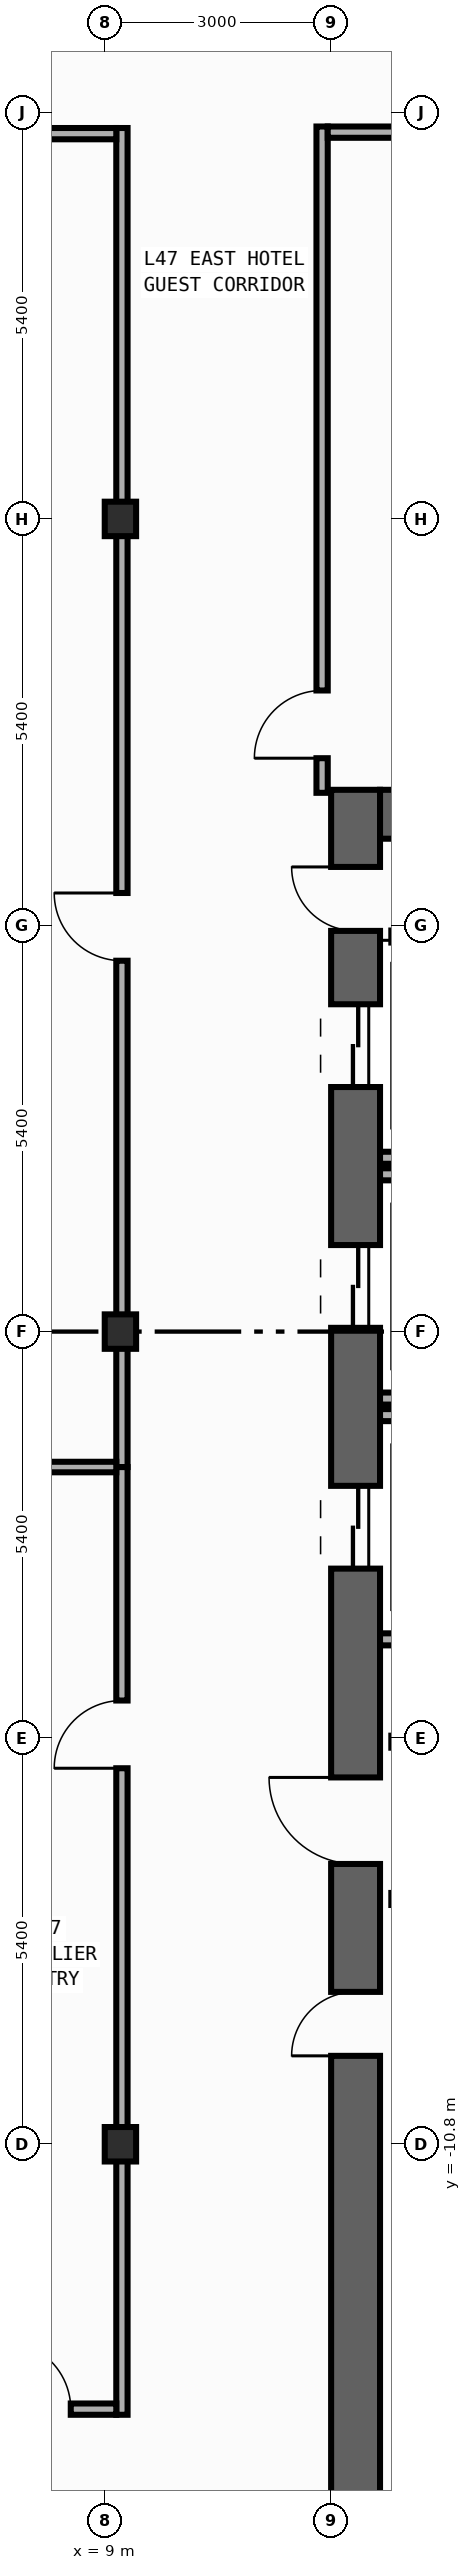
"""IFC4 building model, lengths in metres.
Left out: names, types, materials, properties, quantities, classifications, styles, units other than length and angle.
Written with IfcOpenShell. Run it as: python <this file> out.ifc"""

import sys

from ifc_helpers import new_model, si_unit, direction, frame, frame_2d, origin, origin_2d, place, context, subcontext, project, spatial, rectangle, i_section, extrude, element, fill, save


model = new_model("IFC4")
c1 = context("Model", 3, precision=1e-05, world=origin(), true_north=direction((0.0, 1.0)))
c2 = subcontext(c1, "Body", "Model", "MODEL_VIEW")
j1 = project(units=[si_unit("LENGTHUNIT", "METRE"), si_unit("PLANEANGLEUNIT", "RADIAN")], contexts=[c1])
p1 = place(None, origin())
s1 = spatial("IfcSite", under=j1, at=p1, CompositionType="ELEMENT")
p2 = place(p1, origin())
s2 = spatial("IfcBuilding", under=s1, at=p2, CompositionType="ELEMENT")
p3 = place(p2, frame((0.0, 0.0, 203.0)))
s3 = spatial("IfcBuildingStorey", under=s2, at=p3, CompositionType="ELEMENT", Elevation=203.0)
p4 = place(p3, frame((12.325, -19.8, 0.0), z_axis=(0.0, 0.0, 1.0), x_axis=(0.0, 1.0, 0.0)))
e1 = element("IfcWall", 1, at=p4, inside=s3, PredefinedType="SHEAR", context=c2, shape_type="SweptSolid", body=[
    extrude(rectangle(XDim=27.0, YDim=0.65, at=frame_2d((13.5, 0.0))), origin(), (0.0, 0.0, 1.0), 3.54),
])
p5 = place(p4, frame((23.05, 0.0, 0.0)))
e2 = element("IfcOpeningElement", 2, at=p5, cuts=e1, PredefinedType="OPENING", context=c2, shape_type="SweptSolid", body=[
    extrude(rectangle(XDim=1.1, YDim=2.2, at=frame_2d((0.55, 1.1))), frame((0.0, 0.335, 0.0), z_axis=(0.0, -1.0, 0.0), x_axis=(1.0, 0.0, 0.0)), (0.0, 0.0, 1.0), 0.67),
])
p6 = place(p4, frame((19.85, 0.0, 0.0)))
e3 = element("IfcOpeningElement", 3, at=p6, cuts=e1, PredefinedType="OPENING", context=c2, shape_type="SweptSolid", body=[
    extrude(rectangle(XDim=1.1, YDim=2.2, at=frame_2d((0.55, 1.1))), frame((0.0, 0.335, 0.0), z_axis=(0.0, -1.0, 0.0), x_axis=(1.0, 0.0, 0.0)), (0.0, 0.0, 1.0), 0.67),
])
p7 = place(p4, frame((16.65, 0.0, 0.0)))
e4 = element("IfcOpeningElement", 4, at=p7, cuts=e1, PredefinedType="OPENING", context=c2, shape_type="SweptSolid", body=[
    extrude(rectangle(XDim=1.1, YDim=2.2, at=frame_2d((0.55, 1.1))), frame((0.0, 0.335, 0.0), z_axis=(0.0, -1.0, 0.0), x_axis=(1.0, 0.0, 0.0)), (0.0, 0.0, 1.0), 0.67),
])
p8 = place(p4, frame((10.175, 0.0, 0.0)))
e5 = element("IfcOpeningElement", 5, at=p8, cuts=e1, PredefinedType="OPENING", context=c2, shape_type="SweptSolid", body=[
    extrude(rectangle(XDim=0.85, YDim=2.1, at=frame_2d((0.425, 1.05))), frame((0.0, 0.335, 0.0), z_axis=(0.0, -1.0, 0.0), x_axis=(1.0, 0.0, 0.0)), (0.0, 0.0, 1.0), 0.67),
])
p9 = place(p4, frame((12.725, 0.0, 0.0)))
e6 = element("IfcOpeningElement", 6, at=p9, cuts=e1, PredefinedType="OPENING", context=c2, shape_type="SweptSolid", body=[
    extrude(rectangle(XDim=1.15, YDim=2.2, at=frame_2d((0.575, 1.1))), frame((0.0, 0.335, 0.0), z_axis=(0.0, -1.0, 0.0), x_axis=(1.0, 0.0, 0.0)), (0.0, 0.0, 1.0), 0.67),
])
p10 = place(p4, frame((25.125, 0.0, 0.0)))
e7 = element("IfcOpeningElement", 7, at=p10, cuts=e1, PredefinedType="OPENING", context=c2, shape_type="SweptSolid", body=[
    extrude(rectangle(XDim=0.85, YDim=2.1, at=frame_2d((0.425, 1.05))), frame((0.0, 0.335, 0.0), z_axis=(0.0, -1.0, 0.0), x_axis=(1.0, 0.0, 0.0)), (0.0, 0.0, 1.0), 0.67),
])
p11 = place(p3, frame((12.65, 6.875, 0.0), z_axis=(0.0, 0.0, 1.0), x_axis=(1.0, 0.0, 0.0)))
e8 = element("IfcWall", 8, at=p11, inside=s3, PredefinedType="SHEAR", context=c2, shape_type="SweptSolid", body=[
    extrude(rectangle(XDim=7.1, YDim=0.65, at=frame_2d((3.55, 0.0))), origin(), (0.0, 0.0, 1.0), 3.54),
])
for number, where, z_axis, x_axis in (
    (9, (9.2, -10.8, 0.0), (0.0, 0.0, 1.0), (1.0, 0.0, 0.0)),
    (10, (9.2, 0.0, 0.0), (0.0, 0.0, 1.0), (1.0, 0.0, 0.0)),
    (11, (9.2, 10.8, 0.0), (0.0, 0.0, 1.0), (1.0, 0.0, 0.0)),
):
    element("IfcColumn", number, at=place(p3, frame(where, z_axis=z_axis, x_axis=x_axis)), inside=s3, PredefinedType="COLUMN", context=c2, shape_type="SweptSolid", body=[
        extrude(i_section(OverallWidth=0.417, OverallDepth=0.458, WebThickness=0.03, FlangeThickness=0.05, FilletRadius=0.022, at=origin_2d()), origin(), (0.0, 0.0, 1.0), 3.8),
    ])
for number, where, z_axis, x_axis in (
    (12, (12.65, 2.31, 0.0), (0.0, 0.0, 1.0), (1.0, 0.0, 0.0)),
    (13, (12.65, -0.89, 0.0), (0.0, 0.0, 1.0), (1.0, 0.0, 0.0)),
    (14, (12.65, 2.09, 0.0), (0.0, 0.0, 1.0), (1.0, 0.0, 0.0)),
    (15, (12.65, -4.09, 0.0), (0.0, 0.0, 1.0), (1.0, 0.0, 0.0)),
    (16, (12.65, -1.11, 0.0), (0.0, 0.0, 1.0), (1.0, 0.0, 0.0)),
):
    element("IfcWall", number, at=place(p3, frame(where, z_axis=z_axis, x_axis=x_axis)), inside=s3, PredefinedType="STANDARD", context=c2, shape_type="SweptSolid", body=[
        extrude(rectangle(XDim=2.34, YDim=0.16, at=frame_2d((1.17, 0.0))), origin(), (0.0, 0.0, 1.0), 3.54),
    ])
for number, where, z_axis, x_axis in (
    (17, (12.8, -5.45, 0.0), (0.0, 0.0, 1.0), (1.0, 0.0, 0.0)),
    (18, (12.8, -7.54, 0.0), (0.0, 0.0, 1.0), (1.0, 0.0, 0.0)),
    (19, (12.8, 5.25, 0.0), (0.0, 0.0, 1.0), (1.0, 0.0, 0.0)),
):
    element("IfcWall", number, at=place(p3, frame(where, z_axis=z_axis, x_axis=x_axis)), inside=s3, PredefinedType="STANDARD", context=c2, shape_type="SweptSolid", body=[
        extrude(rectangle(XDim=2.6, YDim=0.16, at=frame_2d((1.3, 0.0))), origin(), (0.0, 0.0, 1.0), 3.54),
    ])
p12 = place(p3, frame((9.22, -14.395, 0.0), z_axis=(0.0, 0.0, 1.0), x_axis=(0.0, 1.0, 0.0)))
e20 = element("IfcWall", 20, at=p12, inside=s3, PredefinedType="PARTITIONING", context=c2, shape_type="SweptSolid", body=[
    extrude(rectangle(XDim=12.595, YDim=0.15, at=frame_2d((6.297, 0.0))), origin(), (0.0, 0.0, 1.0), 2.952),
])
p13 = place(p12, frame((8.592, 0.0, 0.0)))
e21 = element("IfcOpeningElement", 21, at=p13, cuts=e20, PredefinedType="OPENING", context=c2, shape_type="SweptSolid", body=[
    extrude(rectangle(XDim=0.9, YDim=2.15, at=frame_2d((0.45, 1.075))), frame((0.0, 0.085, 0.0), z_axis=(0.0, -1.0, 0.0), x_axis=(1.0, 0.0, 0.0)), (0.0, 0.0, 1.0), 0.17),
])
p14 = place(p3, frame((9.22, -1.8, 0.0), z_axis=(0.0, 0.0, 1.0), x_axis=(0.0, 1.0, 0.0)))
e22 = element("IfcWall", 22, at=p14, inside=s3, PredefinedType="PARTITIONING", context=c2, shape_type="SweptSolid", body=[
    extrude(rectangle(XDim=17.795, YDim=0.15, at=frame_2d((8.897, 0.0))), origin(), (0.0, 0.0, 1.0), 2.952),
])
p15 = place(p14, frame((6.729, 0.0, 0.0)))
e23 = element("IfcOpeningElement", 23, at=p15, cuts=e22, PredefinedType="OPENING", context=c2, shape_type="SweptSolid", body=[
    extrude(rectangle(XDim=0.9, YDim=2.15, at=frame_2d((0.45, 1.075))), frame((0.0, 0.085, 0.0), z_axis=(0.0, -1.0, 0.0), x_axis=(1.0, 0.0, 0.0)), (0.0, 0.0, 1.0), 0.17),
])
p16 = place(p3, frame((11.88, 7.16, 0.0), z_axis=(0.0, 0.0, 1.0), x_axis=(0.0, 1.0, 0.0)))
e24 = element("IfcWall", 24, at=p16, inside=s3, PredefinedType="PARTITIONING", context=c2, shape_type="SweptSolid", body=[
    extrude(rectangle(XDim=8.855, YDim=0.15, at=frame_2d((4.427, 0.0))), origin(), (0.0, 0.0, 1.0), 3.54),
])
p17 = place(p16, frame((0.46, 0.0, 0.0)))
e25 = element("IfcOpeningElement", 25, at=p17, cuts=e24, PredefinedType="OPENING", context=c2, shape_type="SweptSolid", body=[
    extrude(rectangle(XDim=0.9, YDim=2.15, at=frame_2d((0.45, 1.075))), frame((0.0, 0.085, 0.0), z_axis=(0.0, -1.0, 0.0), x_axis=(1.0, 0.0, 0.0)), (0.0, 0.0, 1.0), 0.17),
])
p18 = place(p3, frame((-9.145, 15.92, 0.0), z_axis=(0.0, 0.0, 1.0), x_axis=(1.0, 0.0, 0.0)))
e26 = element("IfcWall", 26, at=p18, inside=s3, PredefinedType="PARTITIONING", context=c2, shape_type="SweptSolid", body=[
    extrude(rectangle(XDim=18.29, YDim=0.15, at=frame_2d((9.145, 0.0))), origin(), (0.0, 0.0, 1.0), 3.54),
])
p19 = place(p18, frame((15.725, 0.0, 0.0)))
e27 = element("IfcOpeningElement", 27, at=p19, cuts=e26, PredefinedType="OPENING", context=c2, shape_type="SweptSolid", body=[
    extrude(rectangle(XDim=0.9, YDim=2.15, at=frame_2d((0.45, 1.075))), frame((0.0, 0.085, 0.0), z_axis=(0.0, -1.0, 0.0), x_axis=(1.0, 0.0, 0.0)), (0.0, 0.0, 1.0), 0.17),
])
p20 = place(p3, frame((11.955, 15.94, 0.0), z_axis=(0.0, 0.0, 1.0), x_axis=(1.0, 0.0, 0.0)))
e28 = element("IfcWall", 28, at=p20, inside=s3, PredefinedType="PARTITIONING", context=c2, shape_type="SweptSolid", body=[
    extrude(rectangle(XDim=10.5, YDim=0.15, at=frame_2d((5.25, 0.0))), origin(), (0.0, 0.0, 1.0), 3.54),
])
p21 = place(p20, frame((4.901, 0.0, 0.0)))
e29 = element("IfcOpeningElement", 29, at=p21, cuts=e28, PredefinedType="OPENING", context=c2, shape_type="SweptSolid", body=[
    extrude(rectangle(XDim=0.9, YDim=2.15, at=frame_2d((0.45, 1.075))), frame((0.0, 0.085, 0.0), z_axis=(0.0, -1.0, 0.0), x_axis=(1.0, 0.0, 0.0)), (0.0, 0.0, 1.0), 0.17),
])
p22 = place(p3, frame((7.18, -14.32, 0.0), z_axis=(0.0, 0.0, 1.0), x_axis=(1.0, 0.0, 0.0)))
e30 = element("IfcWall", 30, at=p22, inside=s3, PredefinedType="PARTITIONING", context=c2, shape_type="SweptSolid", body=[
    extrude(rectangle(XDim=1.965, YDim=0.15, at=frame_2d((0.982, 0.0))), origin(), (0.0, 0.0, 1.0), 3.54),
])
p23 = place(p22, frame((0.46, 0.0, 0.0)))
e31 = element("IfcOpeningElement", 31, at=p23, cuts=e30, PredefinedType="OPENING", context=c2, shape_type="SweptSolid", body=[
    extrude(rectangle(XDim=0.9, YDim=2.15, at=frame_2d((0.45, 1.075))), frame((0.0, 0.085, 0.0), z_axis=(0.0, -1.0, 0.0), x_axis=(1.0, 0.0, 0.0)), (0.0, 0.0, 1.0), 0.17),
])
p24 = place(p3, frame((7.02, -1.8, 0.0), z_axis=(0.0, 0.0, 1.0), x_axis=(1.0, 0.0, 0.0)))
e32 = element("IfcWall", 32, at=p24, inside=s3, PredefinedType="PARTITIONING", context=c2, shape_type="SweptSolid", body=[
    extrude(rectangle(XDim=2.125, YDim=0.14, at=frame_2d((1.062, 0.0))), origin(), (0.0, 0.0, 1.0), 3.54),
])
p25 = place(p5, origin())
e33 = element("IfcDoor", 33, at=p25, inside=s3, OperationType="DOUBLE_DOOR_SLIDING", PredefinedType="DOOR", context=c2, shape_type="SweptSolid", body=[
    extrude(rectangle(XDim=1.1, YDim=2.2, at=frame_2d((0.55, 1.1))), frame((0.0, 0.025, 0.0), z_axis=(0.0, -1.0, 0.0), x_axis=(1.0, 0.0, 0.0)), (0.0, 0.0, 1.0), 0.05),
])
fill(e2, e33)
p26 = place(p6, origin())
e34 = element("IfcDoor", 34, at=p26, inside=s3, OperationType="DOUBLE_DOOR_SLIDING", PredefinedType="DOOR", context=c2, shape_type="SweptSolid", body=[
    extrude(rectangle(XDim=1.1, YDim=2.2, at=frame_2d((0.55, 1.1))), frame((0.0, 0.025, 0.0), z_axis=(0.0, -1.0, 0.0), x_axis=(1.0, 0.0, 0.0)), (0.0, 0.0, 1.0), 0.05),
])
fill(e3, e34)
p27 = place(p7, origin())
e35 = element("IfcDoor", 35, at=p27, inside=s3, OperationType="DOUBLE_DOOR_SLIDING", PredefinedType="DOOR", context=c2, shape_type="SweptSolid", body=[
    extrude(rectangle(XDim=1.1, YDim=2.2, at=frame_2d((0.55, 1.1))), frame((0.0, 0.025, 0.0), z_axis=(0.0, -1.0, 0.0), x_axis=(1.0, 0.0, 0.0)), (0.0, 0.0, 1.0), 0.05),
])
fill(e4, e35)
p28 = place(p8, origin())
e36 = element("IfcDoor", 36, at=p28, inside=s3, OperationType="SINGLE_SWING_LEFT", PredefinedType="DOOR", context=c2, shape_type="SweptSolid", body=[
    extrude(rectangle(XDim=0.85, YDim=2.1, at=frame_2d((0.425, 1.05))), frame((0.0, 0.025, 0.0), z_axis=(0.0, -1.0, 0.0), x_axis=(1.0, 0.0, 0.0)), (0.0, 0.0, 1.0), 0.05),
])
fill(e5, e36)
p29 = place(p9, origin())
e37 = element("IfcDoor", 37, at=p29, inside=s3, OperationType="SINGLE_SWING_RIGHT", PredefinedType="DOOR", context=c2, shape_type="SweptSolid", body=[
    extrude(rectangle(XDim=1.15, YDim=2.2, at=frame_2d((0.575, 1.1))), frame((0.0, 0.025, 0.0), z_axis=(0.0, -1.0, 0.0), x_axis=(1.0, 0.0, 0.0)), (0.0, 0.0, 1.0), 0.05),
])
fill(e6, e37)
p30 = place(p10, origin())
e38 = element("IfcDoor", 38, at=p30, inside=s3, OperationType="SINGLE_SWING_RIGHT", PredefinedType="DOOR", context=c2, shape_type="SweptSolid", body=[
    extrude(rectangle(XDim=0.85, YDim=2.1, at=frame_2d((0.425, 1.05))), frame((0.0, 0.025, 0.0), z_axis=(0.0, -1.0, 0.0), x_axis=(1.0, 0.0, 0.0)), (0.0, 0.0, 1.0), 0.05),
])
fill(e7, e38)
p31 = place(p13, origin())
e39 = element("IfcDoor", 39, at=p31, inside=s3, OperationType="SINGLE_SWING_LEFT", PredefinedType="DOOR", context=c2, shape_type="SweptSolid", body=[
    extrude(rectangle(XDim=0.9, YDim=2.15, at=frame_2d((0.45, 1.075))), frame((0.0, 0.025, 0.0), z_axis=(0.0, -1.0, 0.0), x_axis=(1.0, 0.0, 0.0)), (0.0, 0.0, 1.0), 0.05),
])
fill(e21, e39)
p32 = place(p15, origin())
e40 = element("IfcDoor", 40, at=p32, inside=s3, OperationType="SINGLE_SWING_RIGHT", PredefinedType="DOOR", context=c2, shape_type="SweptSolid", body=[
    extrude(rectangle(XDim=0.9, YDim=2.15, at=frame_2d((0.45, 1.075))), frame((0.0, 0.025, 0.0), z_axis=(0.0, -1.0, 0.0), x_axis=(1.0, 0.0, 0.0)), (0.0, 0.0, 1.0), 0.05),
])
fill(e23, e40)
p33 = place(p17, origin())
e41 = element("IfcDoor", 41, at=p33, inside=s3, OperationType="SINGLE_SWING_LEFT", PredefinedType="DOOR", context=c2, shape_type="SweptSolid", body=[
    extrude(rectangle(XDim=0.9, YDim=2.15, at=frame_2d((0.45, 1.075))), frame((0.0, 0.025, 0.0), z_axis=(0.0, -1.0, 0.0), x_axis=(1.0, 0.0, 0.0)), (0.0, 0.0, 1.0), 0.05),
])
fill(e25, e41)
p34 = place(p23, origin())
e42 = element("IfcDoor", 42, at=p34, inside=s3, OperationType="SINGLE_SWING_LEFT", PredefinedType="DOOR", context=c2, shape_type="SweptSolid", body=[
    extrude(rectangle(XDim=0.9, YDim=2.15, at=frame_2d((0.45, 1.075))), frame((0.0, 0.025, 0.0), z_axis=(0.0, -1.0, 0.0), x_axis=(1.0, 0.0, 0.0)), (0.0, 0.0, 1.0), 0.05),
])
fill(e31, e42)
save(model, sys.argv[1])
